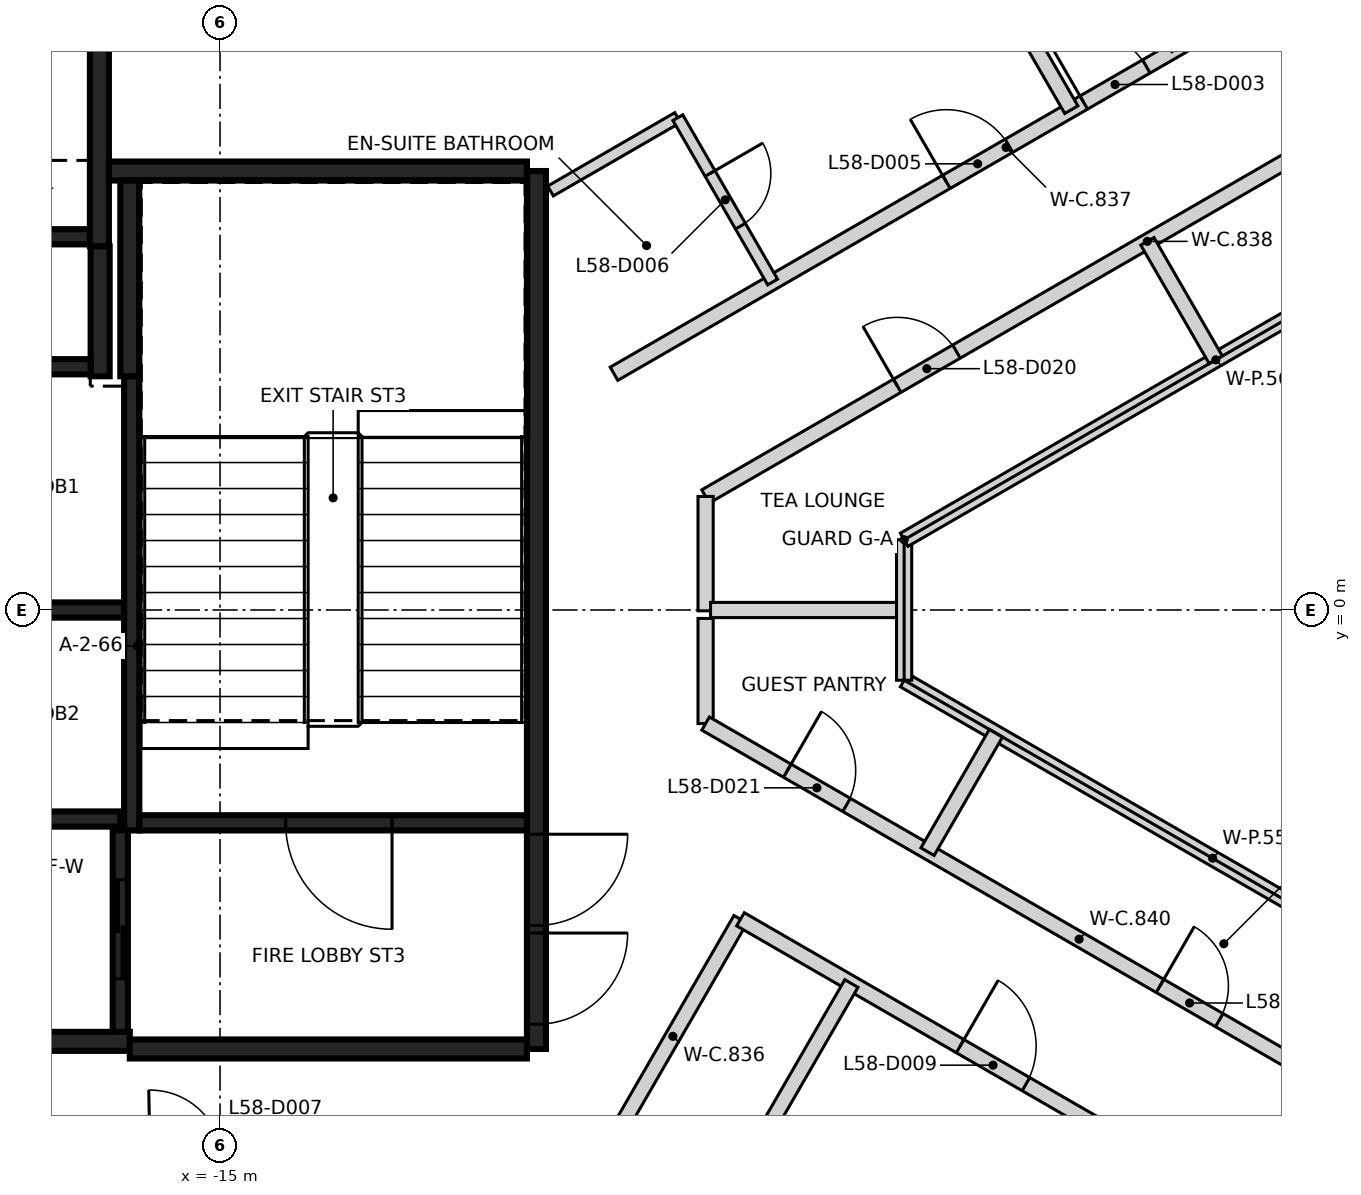
"""IFC4 building model, lengths in metres.
Left out: names, types, materials, properties, quantities, classifications, styles, units other than length and angle.
Written with IfcOpenShell. Run it as: python <this file> out.ifc"""

import sys

from ifc_helpers import new_model, si_unit, direction, frame, frame_2d, origin, place, context, subcontext, project, spatial, rectangle, extrude, element, fill, save


model = new_model("IFC4")
c1 = context("Model", 3, precision=1e-05, world=origin(), true_north=direction((0.0, 1.0)))
c2 = subcontext(c1, "Body", "Model", "MODEL_VIEW")
j1 = project(units=[si_unit("LENGTHUNIT", "METRE"), si_unit("PLANEANGLEUNIT", "RADIAN")], contexts=[c1])
p1 = place(None, origin())
s1 = spatial("IfcSite", under=j1, at=p1, CompositionType="ELEMENT")
p2 = place(p1, origin())
s2 = spatial("IfcBuilding", under=s1, at=p2, CompositionType="ELEMENT")
p3 = place(p2, frame((0.0, 0.0, 232.2)))
s3 = spatial("IfcBuildingStorey", under=s2, at=p3, CompositionType="ELEMENT", Elevation=232.2)
p4 = place(p3, frame((-10.837, 5.775, 0.0), z_axis=(0.0, 0.0, 1.0), x_axis=(0.0, -1.0, 0.0)))
e1 = element("IfcWall", 1, at=p4, inside=s3, PredefinedType="SHEAR", context=c2, shape_type="SweptSolid", body=[
    extrude(rectangle(XDim=11.55, YDim=0.25, at=frame_2d((5.775, 0.0))), origin(), (0.0, 0.0, 1.0), 3.25),
])
p5 = place(p4, frame((10.025, 0.0, 0.0)))
e2 = element("IfcOpeningElement", 2, at=p5, cuts=e1, PredefinedType="OPENING", context=c2, shape_type="SweptSolid", body=[
    extrude(rectangle(XDim=1.2, YDim=2.1, at=frame_2d((0.6, 1.05))), frame((0.0, 0.135, 0.0), z_axis=(0.0, -1.0, 0.0), x_axis=(1.0, 0.0, 0.0)), (0.0, 0.0, 1.0), 0.27),
])
p6 = place(p4, frame((8.725, 0.0, 0.0)))
e3 = element("IfcOpeningElement", 3, at=p6, cuts=e1, PredefinedType="OPENING", context=c2, shape_type="SweptSolid", body=[
    extrude(rectangle(XDim=1.2, YDim=2.1, at=frame_2d((0.6, 1.05))), frame((0.0, 0.135, 0.0), z_axis=(0.0, -1.0, 0.0), x_axis=(1.0, 0.0, 0.0)), (0.0, 0.0, 1.0), 0.27),
])
p7 = place(p3, frame((-16.187, -5.675, 0.0), z_axis=(0.0, 0.0, 1.0), x_axis=(-1.0, 0.0, 0.0)))
e4 = element("IfcWall", 4, at=p7, inside=s3, PredefinedType="SHEAR", context=c2, shape_type="SweptSolid", body=[
    extrude(rectangle(XDim=6.125, YDim=0.25, at=frame_2d((3.062, 0.0))), origin(), (0.0, 0.0, 1.0), 3.25),
])
p8 = place(p7, frame((3.563, 0.0, 0.0)))
e5 = element("IfcOpeningElement", 5, at=p8, cuts=e4, PredefinedType="OPENING", context=c2, shape_type="SweptSolid", body=[
    extrude(rectangle(XDim=1.0, YDim=2.1, at=frame_2d((0.5, 1.05))), frame((0.0, 0.135, 0.0), z_axis=(0.0, -1.0, 0.0), x_axis=(1.0, 0.0, 0.0)), (0.0, 0.0, 1.0), 0.27),
])
p9 = place(p3, frame((-10.963, -5.775, 0.0), z_axis=(0.0, 0.0, 1.0), x_axis=(-1.0, 0.0, 0.0)))
e6 = element("IfcWall", 6, at=p9, inside=s3, PredefinedType="SHEAR", context=c2, shape_type="SweptSolid", body=[
    extrude(rectangle(XDim=5.225, YDim=0.25, at=frame_2d((2.612, 0.0))), origin(), (0.0, 0.0, 1.0), 3.25),
])
p10 = place(p3, frame((-16.472, 5.775, 0.0), z_axis=(0.0, 0.0, 1.0), x_axis=(1.0, 0.0, 0.0)))
e7 = element("IfcWall", 7, at=p10, inside=s3, PredefinedType="SHEAR", context=c2, shape_type="SweptSolid", body=[
    extrude(rectangle(XDim=5.51, YDim=0.25, at=frame_2d((2.755, 0.0))), origin(), (0.0, 0.0, 1.0), 3.25),
])
p11 = place(p3, frame((-16.587, 7.65, 0.0), z_axis=(0.0, 0.0, 1.0), x_axis=(0.0, -1.0, 0.0)))
e8 = element("IfcWall", 8, at=p11, inside=s3, PredefinedType="SHEAR", context=c2, shape_type="SweptSolid", body=[
    extrude(rectangle(XDim=2.865, YDim=0.25, at=frame_2d((1.432, 0.0))), origin(), (0.0, 0.0, 1.0), 3.25),
])
p12 = place(p3, frame((-16.187, 3.075, 0.0), z_axis=(0.0, 0.0, 1.0), x_axis=(0.0, 1.0, 0.0)))
e9 = element("IfcWall", 9, at=p12, inside=s3, PredefinedType="SHEAR", context=c2, shape_type="SweptSolid", body=[
    extrude(rectangle(XDim=2.575, YDim=0.25, at=frame_2d((1.287, 0.0))), origin(), (0.0, 0.0, 1.0), 3.25),
])
p13 = place(p3, frame((-16.577, 4.785, 0.0), z_axis=(0.0, 0.0, 1.0), x_axis=(0.0, -1.0, 0.0)))
e10 = element("IfcWall", 10, at=p13, inside=s3, PredefinedType="SHEAR", context=c2, shape_type="SweptSolid", body=[
    extrude(rectangle(XDim=1.71, YDim=0.25, at=frame_2d((0.855, 0.0))), origin(), (0.0, 0.0, 1.0), 3.25),
])
p14 = place(p3, frame((-16.162, 3.074, 0.0), z_axis=(0.0, 0.0, 1.0), x_axis=(0.0, -1.0, 0.0)))
e11 = element("IfcWall", 11, at=p14, inside=s3, PredefinedType="SHEAR", context=c2, shape_type="SweptSolid", body=[
    extrude(rectangle(XDim=5.974, YDim=0.2, at=frame_2d((2.987, 0.0))), origin(), (0.0, 0.0, 1.0), 3.25),
])
p15 = place(p3, frame((-10.963, -2.8, 0.0), z_axis=(0.0, 0.0, 1.0), x_axis=(-1.0, 0.0, 0.0)))
e12 = element("IfcWall", 12, at=p15, inside=s3, PredefinedType="SHEAR", context=c2, shape_type="SweptSolid", body=[
    extrude(rectangle(XDim=5.098, YDim=0.2, at=frame_2d((2.549, 0.0))), origin(), (0.0, 0.0, 1.0), 3.25),
])
p16 = place(p15, frame((1.774, 0.0, 0.0)))
e13 = element("IfcOpeningElement", 13, at=p16, cuts=e12, PredefinedType="OPENING", context=c2, shape_type="SweptSolid", body=[
    extrude(rectangle(XDim=1.4, YDim=2.1, at=frame_2d((0.7, 1.05))), frame((0.0, 0.11, 0.0), z_axis=(0.0, -1.0, 0.0), x_axis=(1.0, 0.0, 0.0)), (0.0, 0.0, 1.0), 0.22),
])
p17 = place(p3, frame((-16.263, 0.0, 0.0), z_axis=(0.0, 0.0, 1.0), x_axis=(-1.0, 0.0, 0.0)))
e14 = element("IfcWall", 14, at=p17, inside=s3, PredefinedType="SHEAR", context=c2, shape_type="SweptSolid", body=[
    extrude(rectangle(XDim=3.198, YDim=0.2, at=frame_2d((1.599, 0.0))), origin(), (0.0, 0.0, 1.0), 3.25),
])
p18 = place(p3, frame((-19.511, 4.91, 0.0), z_axis=(0.0, 0.0, 1.0), x_axis=(1.0, 0.0, 0.0)))
e15 = element("IfcWall", 15, at=p18, inside=s3, PredefinedType="SHEAR", context=c2, shape_type="SweptSolid", body=[
    extrude(rectangle(XDim=2.798, YDim=0.2, at=frame_2d((1.399, 0.0))), origin(), (0.0, 0.0, 1.0), 3.25),
])
p19 = place(p18, frame((0.949, 0.0, 0.0)))
e16 = element("IfcOpeningElement", 16, at=p19, cuts=e15, PredefinedType="OPENING", context=c2, shape_type="SweptSolid", body=[
    extrude(rectangle(XDim=0.9, YDim=2.1, at=frame_2d((0.45, 1.05))), frame((0.0, 0.11, 0.0), z_axis=(0.0, -1.0, 0.0), x_axis=(1.0, 0.0, 0.0)), (0.0, 0.0, 1.0), 0.22),
])
p20 = place(p3, frame((-19.462, 3.2, 0.0), z_axis=(0.0, 0.0, 1.0), x_axis=(1.0, 0.0, 0.0)))
e17 = element("IfcWall", 17, at=p20, inside=s3, PredefinedType="SHEAR", context=c2, shape_type="SweptSolid", body=[
    extrude(rectangle(XDim=2.759, YDim=0.2, at=frame_2d((1.379, 0.0))), origin(), (0.0, 0.0, 1.0), 3.25),
])
p21 = place(p3, frame((-19.412, -2.75, 0.0), z_axis=(0.0, 0.0, 1.0), x_axis=(1.0, 0.0, 0.0)))
e18 = element("IfcWall", 18, at=p21, inside=s3, PredefinedType="SHEAR", context=c2, shape_type="SweptSolid", body=[
    extrude(rectangle(XDim=3.1, YDim=0.2, at=frame_2d((1.55, 0.0))), origin(), (0.0, 0.0, 1.0), 3.25),
])
p22 = place(p3, frame((-16.312, -2.898, 0.0), z_axis=(0.0, 0.0, 1.0), x_axis=(0.0, -1.0, 0.0)))
e19 = element("IfcWall", 19, at=p22, inside=s3, PredefinedType="SHEAR", context=c2, shape_type="SweptSolid", body=[
    extrude(rectangle(XDim=2.651, YDim=0.2, at=frame_2d((1.325, 0.0))), origin(), (0.0, 0.0, 1.0), 3.25),
])
p23 = place(p22, frame((0.652, 0.0, 0.0)))
e20 = element("IfcOpeningElement", 20, at=p23, cuts=e19, PredefinedType="OPENING", context=c2, shape_type="SweptSolid", body=[
    extrude(rectangle(XDim=1.3, YDim=2.1, at=frame_2d((0.65, 1.05))), frame((0.0, 0.11, 0.0), z_axis=(0.0, -1.0, 0.0), x_axis=(1.0, 0.0, 0.0)), (0.0, 0.0, 1.0), 0.22),
])
p24 = place(p3, frame((-9.931, -7.149, 0.0), z_axis=(0.0, 0.0, 1.0), x_axis=(0.499934418432, 0.86606326401, 0.0)))
e21 = element("IfcWall", 21, at=p24, inside=s3, PredefinedType="PARTITIONING", context=c2, shape_type="SweptSolid", body=[
    extrude(rectangle(XDim=3.556, YDim=0.2, at=frame_2d((1.778, 0.0))), origin(), (0.0, 0.0, 1.0), 3.25),
])
p25 = place(p3, frame((-9.817, 3.108, 0.0), z_axis=(0.0, 0.0, 1.0), x_axis=(0.86603471326, 0.499983875168, 0.0)))
e22 = element("IfcWall", 22, at=p25, inside=s3, PredefinedType="PARTITIONING", context=c2, shape_type="SweptSolid", body=[
    extrude(rectangle(XDim=11.911, YDim=0.2, at=frame_2d((5.955, 0.0))), origin(), (0.0, 0.0, 1.0), 3.25),
])
p26 = place(p25, frame((7.136, 0.0, 0.0)))
e23 = element("IfcOpeningElement", 23, at=p26, cuts=e22, PredefinedType="OPENING", context=c2, shape_type="SweptSolid", body=[
    extrude(rectangle(XDim=0.95, YDim=2.1, at=frame_2d((0.475, 1.05))), frame((0.0, 0.11, 0.0), z_axis=(0.0, -1.0, 0.0), x_axis=(1.0, 0.0, 0.0)), (0.0, 0.0, 1.0), 0.22),
])
p27 = place(p25, frame((5.049, 0.0, 0.0)))
e24 = element("IfcOpeningElement", 24, at=p27, cuts=e22, PredefinedType="OPENING", context=c2, shape_type="SweptSolid", body=[
    extrude(rectangle(XDim=0.95, YDim=2.1, at=frame_2d((0.475, 1.05))), frame((0.0, 0.11, 0.0), z_axis=(0.0, -1.0, 0.0), x_axis=(1.0, 0.0, 0.0)), (0.0, 0.0, 1.0), 0.22),
])
p28 = place(p3, frame((-8.612, 1.494, 0.0), z_axis=(0.0, 0.0, 1.0), x_axis=(0.8660441356, 0.49996755414, 0.0)))
e25 = element("IfcWall", 25, at=p28, inside=s3, PredefinedType="PARTITIONING", context=c2, shape_type="SweptSolid", body=[
    extrude(rectangle(XDim=13.422, YDim=0.2, at=frame_2d((6.711, 0.0))), origin(), (0.0, 0.0, 1.0), 3.25),
])
p29 = place(p28, frame((9.611, 0.0, 0.0)))
e26 = element("IfcOpeningElement", 26, at=p29, cuts=e25, PredefinedType="OPENING", context=c2, shape_type="SweptSolid", body=[
    extrude(rectangle(XDim=0.9, YDim=2.1, at=frame_2d((0.45, 1.05))), frame((0.0, 0.11, 0.0), z_axis=(0.0, -1.0, 0.0), x_axis=(1.0, 0.0, 0.0)), (0.0, 0.0, 1.0), 0.22),
])
p30 = place(p28, frame((2.911, 0.0, 0.0)))
e27 = element("IfcOpeningElement", 27, at=p30, cuts=e25, PredefinedType="OPENING", context=c2, shape_type="SweptSolid", body=[
    extrude(rectangle(XDim=0.9, YDim=2.1, at=frame_2d((0.45, 1.05))), frame((0.0, 0.11, 0.0), z_axis=(0.0, -1.0, 0.0), x_axis=(1.0, 0.0, 0.0)), (0.0, 0.0, 1.0), 0.22),
])
p31 = place(p3, frame((-8.612, -1.494, 0.0), z_axis=(0.0, 0.0, 1.0), x_axis=(0.0, 1.0, 0.0)))
e28 = element("IfcWall", 28, at=p31, inside=s3, PredefinedType="PARTITIONING", context=c2, shape_type="SweptSolid", body=[
    extrude(rectangle(XDim=1.383, YDim=0.2, at=frame_2d((0.691, 0.0))), origin(), (0.0, 0.0, 1.0), 3.25),
])
p32 = place(p3, frame((-8.612, -1.494, 0.0), z_axis=(0.0, 0.0, 1.0), x_axis=(0.866035468681, -0.499982566683, 0.0)))
e29 = element("IfcWall", 29, at=p32, inside=s3, PredefinedType="PARTITIONING", context=c2, shape_type="SweptSolid", body=[
    extrude(rectangle(XDim=11.348, YDim=0.2, at=frame_2d((5.674, 0.0))), origin(), (0.0, 0.0, 1.0), 3.25),
])
p33 = place(p32, frame((1.241, 0.0, 0.0)))
e30 = element("IfcOpeningElement", 30, at=p33, cuts=e29, PredefinedType="OPENING", context=c2, shape_type="SweptSolid", body=[
    extrude(rectangle(XDim=0.9, YDim=2.1, at=frame_2d((0.45, 1.05))), frame((0.0, 0.11, 0.0), z_axis=(0.0, -1.0, 0.0), x_axis=(1.0, 0.0, 0.0)), (0.0, 0.0, 1.0), 0.22),
])
p34 = place(p32, frame((6.903, 0.0, 0.0)))
e31 = element("IfcOpeningElement", 31, at=p34, cuts=e29, PredefinedType="OPENING", context=c2, shape_type="SweptSolid", body=[
    extrude(rectangle(XDim=0.9, YDim=2.1, at=frame_2d((0.45, 1.05))), frame((0.0, 0.11, 0.0), z_axis=(0.0, -1.0, 0.0), x_axis=(1.0, 0.0, 0.0)), (0.0, 0.0, 1.0), 0.22),
])
p35 = place(p3, frame((-8.612, -0.011, 0.0), z_axis=(0.0, 0.0, 1.0), x_axis=(0.0, 1.0, 0.0)))
e32 = element("IfcWall", 32, at=p35, inside=s3, PredefinedType="PARTITIONING", context=c2, shape_type="SweptSolid", body=[
    extrude(rectangle(XDim=1.505, YDim=0.2, at=frame_2d((0.752, 0.0))), origin(), (0.0, 0.0, 1.0), 3.25),
])
p36 = place(p3, frame((-8.153, -4.069, 0.0), z_axis=(0.0, 0.0, 1.0), x_axis=(0.865955522833, -0.500121017829, 0.0)))
e33 = element("IfcWall", 33, at=p36, inside=s3, PredefinedType="PARTITIONING", context=c2, shape_type="SweptSolid", body=[
    extrude(rectangle(XDim=12.937, YDim=0.2, at=frame_2d((6.469, 0.0))), origin(), (0.0, 0.0, 1.0), 3.25),
])
p37 = place(p36, frame((3.337, 0.0, 0.0)))
e34 = element("IfcOpeningElement", 34, at=p37, cuts=e33, PredefinedType="OPENING", context=c2, shape_type="SweptSolid", body=[
    extrude(rectangle(XDim=1.0, YDim=2.1, at=frame_2d((0.5, 1.05))), frame((0.0, 0.11, 0.0), z_axis=(0.0, -1.0, 0.0), x_axis=(1.0, 0.0, 0.0)), (0.0, 0.0, 1.0), 0.22),
])
p38 = place(p36, frame((9.153, 0.0, 0.0)))
e35 = element("IfcOpeningElement", 35, at=p38, cuts=e33, PredefinedType="OPENING", context=c2, shape_type="SweptSolid", body=[
    extrude(rectangle(XDim=0.95, YDim=2.1, at=frame_2d((0.475, 1.05))), frame((0.0, 0.11, 0.0), z_axis=(0.0, -1.0, 0.0), x_axis=(1.0, 0.0, 0.0)), (0.0, 0.0, 1.0), 0.22),
])
p39 = place(p36, frame((11.144, 0.0, 0.0)))
e36 = element("IfcOpeningElement", 36, at=p39, cuts=e33, PredefinedType="OPENING", context=c2, shape_type="SweptSolid", body=[
    extrude(rectangle(XDim=1.0, YDim=2.1, at=frame_2d((0.5, 1.05))), frame((0.0, 0.11, 0.0), z_axis=(0.0, -1.0, 0.0), x_axis=(1.0, 0.0, 0.0)), (0.0, 0.0, 1.0), 0.22),
])
p40 = place(p3, frame((-12.407, -14.806, 0.0), z_axis=(0.0, 0.0, 1.0), x_axis=(0.500104175471, 0.865965249693, 0.0)))
e37 = element("IfcWall", 37, at=p40, inside=s3, PredefinedType="PARTITIONING", context=c2, shape_type="SweptSolid", body=[
    extrude(rectangle(XDim=11.423, YDim=0.2, at=frame_2d((5.711, 0.0))), origin(), (0.0, 0.0, 1.0), 2.35),
])
p41 = place(p3, frame((-9.525, 16.498, 0.0), z_axis=(0.0, 0.0, 1.0), x_axis=(0.500030684965, -0.866007687087, 0.0)))
e38 = element("IfcWall", 38, at=p41, inside=s3, PredefinedType="PARTITIONING", context=c2, shape_type="SweptSolid", body=[
    extrude(rectangle(XDim=11.45, YDim=0.2, at=frame_2d((5.725, 0.0))), origin(), (0.0, 0.0, 1.0), 3.25),
])
p42 = place(p3, frame((-8.547, 0.0, 0.0), z_axis=(0.0, 0.0, 1.0), x_axis=(1.0, 0.0, 0.0)))
e39 = element("IfcWall", 39, at=p42, inside=s3, PredefinedType="PARTITIONING", context=c2, shape_type="SweptSolid", body=[
    extrude(rectangle(XDim=2.547, YDim=0.2, at=frame_2d((1.273, 0.0))), origin(), (0.0, 0.0, 1.0), 3.25),
])
p43 = place(p3, frame((-6.0, -0.924, 0.0), z_axis=(0.0, 0.0, 1.0), x_axis=(0.866223755075, -0.499656288007, 0.0)))
e40 = element("IfcWall", 40, at=p43, inside=s3, PredefinedType="PARTITIONING", context=c2, shape_type="SweptSolid", body=[
    extrude(rectangle(XDim=9.37, YDim=0.2, at=frame_2d((4.685, 0.0))), origin(), (0.0, 0.0, 1.0), 3.25),
])
p44 = place(p3, frame((-6.0, -0.924, 0.0), z_axis=(0.0, 0.0, 1.0), x_axis=(0.0, 1.0, 0.0)))
e41 = element("IfcWall", 41, at=p44, inside=s3, PredefinedType="PARTITIONING", context=c2, shape_type="SweptSolid", body=[
    extrude(rectangle(XDim=1.848, YDim=0.2, at=frame_2d((0.924, 0.0))), origin(), (0.0, 0.0, 1.0), 3.25),
])
p45 = place(p3, frame((-6.0, 0.924, 0.0), z_axis=(0.0, 0.0, 1.0), x_axis=(0.866012967051, 0.500021540435, 0.0)))
e42 = element("IfcWall", 42, at=p45, inside=s3, PredefinedType="PARTITIONING", context=c2, shape_type="SweptSolid", body=[
    extrude(rectangle(XDim=9.468, YDim=0.2, at=frame_2d((4.734, 0.0))), origin(), (0.0, 0.0, 1.0), 3.25),
])
for number, where, z_axis, x_axis in (
    (43, (-5.692, -3.179, 0.0), (0.0, 0.0, 1.0), (0.5, 0.866, 0.0)),
    (44, (-2.8, 4.85, 0.0), (0.0, 0.0, 1.0), (0.5, -0.866, 0.0)),
):
    element("IfcWall", number, at=place(p3, frame(where, z_axis=z_axis, x_axis=x_axis)), inside=s3, PredefinedType="PARTITIONING", context=c2, shape_type="SweptSolid", body=[
        extrude(rectangle(XDim=1.8, YDim=0.2, at=frame_2d((0.9, 0.0))), origin(), (0.0, 0.0, 1.0), 3.25),
    ])
p46 = place(p3, frame((-10.652, 5.512, 0.0), z_axis=(0.0, 0.0, 1.0), x_axis=(0.866017156151, 0.500014285048, 0.0)))
e45 = element("IfcWall", 45, at=p46, inside=s3, PredefinedType="PARTITIONING", context=c2, shape_type="SweptSolid", body=[
    extrude(rectangle(XDim=1.931, YDim=0.15, at=frame_2d((0.966, 0.0))), origin(), (0.0, 0.0, 1.0), 3.25),
])
p47 = place(p3, frame((-8.977, 6.477, 0.0), z_axis=(0.0, 0.0, 1.0), x_axis=(0.499632127845, -0.86623769072, 0.0)))
e46 = element("IfcWall", 46, at=p47, inside=s3, PredefinedType="PARTITIONING", context=c2, shape_type="SweptSolid", body=[
    extrude(rectangle(XDim=2.496, YDim=0.15, at=frame_2d((1.248, 0.0))), origin(), (0.0, 0.0, 1.0), 3.25),
])
p48 = place(p47, frame((0.847, 0.0, 0.0)))
e47 = element("IfcOpeningElement", 47, at=p48, cuts=e46, PredefinedType="OPENING", context=c2, shape_type="SweptSolid", body=[
    extrude(rectangle(XDim=0.8, YDim=2.1, at=frame_2d((0.4, 1.05))), frame((0.0, 0.085, 0.0), z_axis=(0.0, -1.0, 0.0), x_axis=(1.0, 0.0, 0.0)), (0.0, 0.0, 1.0), 0.17),
])
p49 = place(p23, origin())
e48 = element("IfcDoor", 48, at=p49, inside=s3, OperationType="SLIDING_TO_RIGHT", PredefinedType="DOOR", context=c2, shape_type="SweptSolid", body=[
    extrude(rectangle(XDim=1.3, YDim=2.1, at=frame_2d((0.65, 1.05))), frame((0.0, 0.025, 0.0), z_axis=(0.0, -1.0, 0.0), x_axis=(1.0, 0.0, 0.0)), (0.0, 0.0, 1.0), 0.05),
])
fill(e20, e48)
p50 = place(p5, origin())
e49 = element("IfcDoor", 49, at=p50, inside=s3, OperationType="SINGLE_SWING_LEFT", PredefinedType="DOOR", context=c2, shape_type="SweptSolid", body=[
    extrude(rectangle(XDim=1.2, YDim=2.1, at=frame_2d((0.6, 1.05))), frame((0.0, 0.025, 0.0), z_axis=(0.0, -1.0, 0.0), x_axis=(1.0, 0.0, 0.0)), (0.0, 0.0, 1.0), 0.05),
])
fill(e2, e49)
p51 = place(p6, origin())
e50 = element("IfcDoor", 50, at=p51, inside=s3, OperationType="SINGLE_SWING_RIGHT", PredefinedType="DOOR", context=c2, shape_type="SweptSolid", body=[
    extrude(rectangle(XDim=1.2, YDim=2.1, at=frame_2d((0.6, 1.05))), frame((0.0, 0.025, 0.0), z_axis=(0.0, -1.0, 0.0), x_axis=(1.0, 0.0, 0.0)), (0.0, 0.0, 1.0), 0.05),
])
fill(e3, e50)
p52 = place(p16, origin())
e51 = element("IfcDoor", 51, at=p52, inside=s3, OperationType="SINGLE_SWING_RIGHT", PredefinedType="DOOR", context=c2, shape_type="SweptSolid", body=[
    extrude(rectangle(XDim=1.4, YDim=2.1, at=frame_2d((0.7, 1.05))), frame((0.0, 0.025, 0.0), z_axis=(0.0, -1.0, 0.0), x_axis=(1.0, 0.0, 0.0)), (0.0, 0.0, 1.0), 0.05),
])
fill(e13, e51)
p53 = place(p26, origin())
e52 = element("IfcDoor", 52, at=p53, inside=s3, OperationType="SINGLE_SWING_LEFT", PredefinedType="DOOR", context=c2, shape_type="SweptSolid", body=[
    extrude(rectangle(XDim=0.95, YDim=2.1, at=frame_2d((0.475, 1.05))), frame((0.0, 0.025, 0.0), z_axis=(0.0, -1.0, 0.0), x_axis=(1.0, 0.0, 0.0)), (0.0, 0.0, 1.0), 0.05),
])
fill(e23, e52)
p54 = place(p27, origin())
e53 = element("IfcDoor", 53, at=p54, inside=s3, OperationType="SINGLE_SWING_LEFT", PredefinedType="DOOR", context=c2, shape_type="SweptSolid", body=[
    extrude(rectangle(XDim=0.95, YDim=2.1, at=frame_2d((0.475, 1.05))), frame((0.0, 0.025, 0.0), z_axis=(0.0, -1.0, 0.0), x_axis=(1.0, 0.0, 0.0)), (0.0, 0.0, 1.0), 0.05),
])
fill(e24, e53)
p55 = place(p48, frame((0.8, 0.0, 0.0), z_axis=(0.0, 0.0, 1.0), x_axis=(-1.0, 0.0, 0.0)))
e54 = element("IfcDoor", 54, at=p55, inside=s3, OperationType="SINGLE_SWING_LEFT", PredefinedType="DOOR", context=c2, shape_type="SweptSolid", body=[
    extrude(rectangle(XDim=0.8, YDim=2.1, at=frame_2d((0.4, 1.05))), frame((0.0, 0.025, 0.0), z_axis=(0.0, -1.0, 0.0), x_axis=(1.0, 0.0, 0.0)), (0.0, 0.0, 1.0), 0.05),
])
fill(e47, e54)
p56 = place(p37, frame((1.0, 0.0, 0.0), z_axis=(0.0, 0.0, 1.0), x_axis=(-1.0, 0.0, 0.0)))
e55 = element("IfcDoor", 55, at=p56, inside=s3, OperationType="SINGLE_SWING_LEFT", PredefinedType="DOOR", context=c2, shape_type="SweptSolid", body=[
    extrude(rectangle(XDim=1.0, YDim=2.1, at=frame_2d((0.5, 1.05))), frame((0.0, 0.025, 0.0), z_axis=(0.0, -1.0, 0.0), x_axis=(1.0, 0.0, 0.0)), (0.0, 0.0, 1.0), 0.05),
])
fill(e34, e55)
p57 = place(p30, frame((0.9, 0.0, 0.0), z_axis=(0.0, 0.0, 1.0), x_axis=(-1.0, 0.0, 0.0)))
e56 = element("IfcDoor", 56, at=p57, inside=s3, OperationType="SINGLE_SWING_LEFT", PredefinedType="DOOR", context=c2, shape_type="SweptSolid", body=[
    extrude(rectangle(XDim=0.9, YDim=2.1, at=frame_2d((0.45, 1.05))), frame((0.0, 0.025, 0.0), z_axis=(0.0, -1.0, 0.0), x_axis=(1.0, 0.0, 0.0)), (0.0, 0.0, 1.0), 0.05),
])
fill(e27, e56)
p58 = place(p33, origin())
e57 = element("IfcDoor", 57, at=p58, inside=s3, OperationType="SINGLE_SWING_LEFT", PredefinedType="DOOR", context=c2, shape_type="SweptSolid", body=[
    extrude(rectangle(XDim=0.9, YDim=2.1, at=frame_2d((0.45, 1.05))), frame((0.0, 0.025, 0.0), z_axis=(0.0, -1.0, 0.0), x_axis=(1.0, 0.0, 0.0)), (0.0, 0.0, 1.0), 0.05),
])
fill(e30, e57)
p59 = place(p34, origin())
e58 = element("IfcDoor", 58, at=p59, inside=s3, OperationType="SINGLE_SWING_LEFT", PredefinedType="DOOR", context=c2, shape_type="SweptSolid", body=[
    extrude(rectangle(XDim=0.9, YDim=2.1, at=frame_2d((0.45, 1.05))), frame((0.0, 0.025, 0.0), z_axis=(0.0, -1.0, 0.0), x_axis=(1.0, 0.0, 0.0)), (0.0, 0.0, 1.0), 0.05),
])
fill(e31, e58)
save(model, sys.argv[1])
